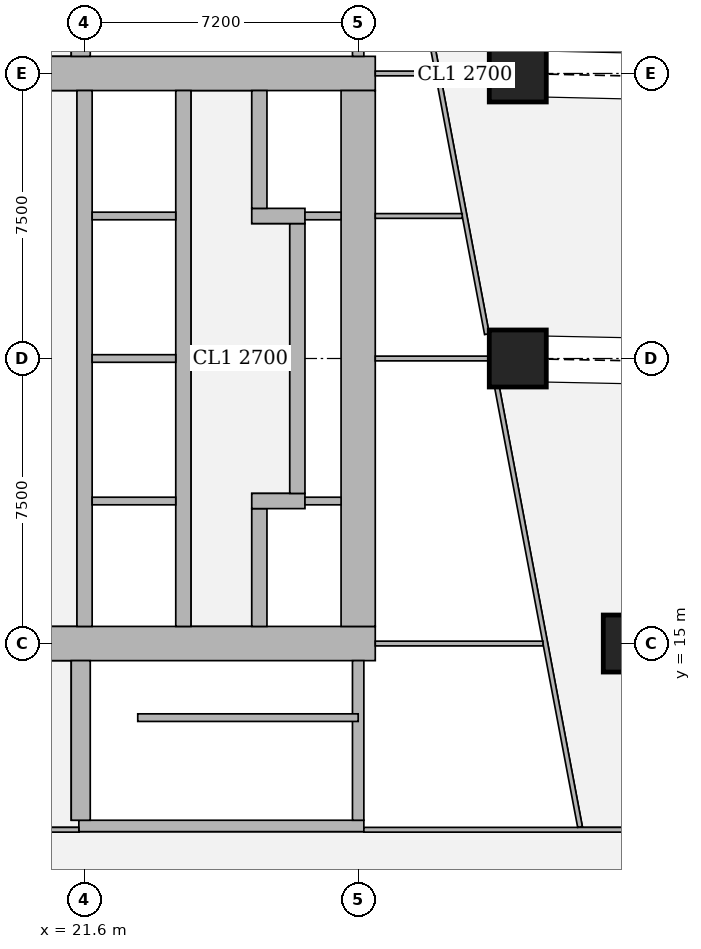
"""IFC4 building model, lengths in metres.
Left out: names, types, materials, properties, quantities, classifications, styles, units other than length and angle.
Written with IfcOpenShell. Run it as: python <this file> out.ifc"""

import sys

from ifc_helpers import new_model, si_unit, direction, frame, frame_2d, origin, origin_2d, place, context, subcontext, project, spatial, rectangle, extrude, element, fill, save


model = new_model("IFC4")
c1 = context("Model", 3, precision=1e-05, world=origin(), true_north=direction((0.0, 1.0)))
c2 = subcontext(c1, "Body", "Model", "MODEL_VIEW")
j1 = project(units=[si_unit("LENGTHUNIT", "METRE"), si_unit("PLANEANGLEUNIT", "RADIAN")], contexts=[c1])
p1 = place(None, origin())
s1 = spatial("IfcSite", under=j1, at=p1, CompositionType="ELEMENT")
p2 = place(p1, origin())
s2 = spatial("IfcBuilding", under=s1, at=p2, CompositionType="ELEMENT")
p3 = place(p2, frame((0.0, 0.0, 147.05)))
s3 = spatial("IfcBuildingStorey", under=s2, at=p3, CompositionType="ELEMENT", Elevation=147.05)
for number, where, z_axis, x_axis in (
    (1, (36.0, 15.0, 0.0), (0.0, 0.0, 1.0), (1.0, 0.0, 0.0)),
    (2, (33.0, 22.5, 0.0), (0.0, 0.0, 1.0), (1.0, 0.0, 0.0)),
    (3, (33.0, 30.0, 0.0), (0.0, 0.0, 1.0), (1.0, 0.0, 0.0)),
):
    element("IfcColumn", number, at=place(p3, frame(where, z_axis=z_axis, x_axis=x_axis)), inside=s3, PredefinedType="COLUMN", context=c2, shape_type="SweptSolid", body=[
        extrude(rectangle(XDim=1.5, YDim=1.5, at=origin_2d()), origin(), (0.0, 0.0, 1.0), 3.75),
    ])
p4 = place(p3, frame((13.95, 15.0, 0.0), z_axis=(0.0, 0.0, 1.0), x_axis=(1.0, 0.0, 0.0)))
e4 = element("IfcWall", 4, at=p4, inside=s3, PredefinedType="SHEAR", context=c2, shape_type="SweptSolid", body=[
    extrude(rectangle(XDim=15.3, YDim=0.9, at=frame_2d((7.65, 0.0))), origin(), (0.0, 0.0, 1.0), 3.75),
])
p5 = place(p4, frame((4.45, 0.0, 0.0)))
e5 = element("IfcOpeningElement", 5, at=p5, cuts=e4, PredefinedType="OPENING", context=c2, shape_type="SweptSolid", body=[
    extrude(rectangle(XDim=1.8, YDim=2.1, at=frame_2d((0.9, 1.05))), frame((0.0, 0.46, 0.0), z_axis=(0.0, -1.0, 0.0), x_axis=(1.0, 0.0, 0.0)), (0.0, 0.0, 1.0), 0.92),
])
p6 = place(p4, frame((10.7, 0.0, 0.0)))
e6 = element("IfcOpeningElement", 6, at=p6, cuts=e4, PredefinedType="OPENING", context=c2, shape_type="SweptSolid", body=[
    extrude(rectangle(XDim=1.1, YDim=2.1, at=frame_2d((0.55, 1.05))), frame((0.0, 0.46, 0.0), z_axis=(0.0, -1.0, 0.0), x_axis=(1.0, 0.0, 0.0)), (0.0, 0.0, 1.0), 0.92),
])
p7 = place(p3, frame((13.95, 30.0, 0.0), z_axis=(0.0, 0.0, 1.0), x_axis=(1.0, 0.0, 0.0)))
e7 = element("IfcWall", 7, at=p7, inside=s3, PredefinedType="SHEAR", context=c2, shape_type="SweptSolid", body=[
    extrude(rectangle(XDim=15.3, YDim=0.9, at=frame_2d((7.65, 0.0))), origin(), (0.0, 0.0, 1.0), 3.75),
])
p8 = place(p7, frame((4.45, 0.0, 0.0)))
e8 = element("IfcOpeningElement", 8, at=p8, cuts=e7, PredefinedType="OPENING", context=c2, shape_type="SweptSolid", body=[
    extrude(rectangle(XDim=1.8, YDim=2.1, at=frame_2d((0.9, 1.05))), frame((0.0, 0.46, 0.0), z_axis=(0.0, -1.0, 0.0), x_axis=(1.0, 0.0, 0.0)), (0.0, 0.0, 1.0), 0.92),
])
p9 = place(p7, frame((10.7, 0.0, 0.0)))
e9 = element("IfcOpeningElement", 9, at=p9, cuts=e7, PredefinedType="OPENING", context=c2, shape_type="SweptSolid", body=[
    extrude(rectangle(XDim=1.1, YDim=2.1, at=frame_2d((0.55, 1.05))), frame((0.0, 0.46, 0.0), z_axis=(0.0, -1.0, 0.0), x_axis=(1.0, 0.0, 0.0)), (0.0, 0.0, 1.0), 0.92),
])
p10 = place(p3, frame((28.8, 15.45, 0.0), z_axis=(0.0, 0.0, 1.0), x_axis=(0.0, 1.0, 0.0)))
e10 = element("IfcWall", 10, at=p10, inside=s3, PredefinedType="SHEAR", context=c2, shape_type="SweptSolid", body=[
    extrude(rectangle(XDim=14.1, YDim=0.9, at=frame_2d((7.05, 0.0))), origin(), (0.0, 0.0, 1.0), 3.75),
])
p11 = place(p3, frame((21.6, 15.45, 0.0), z_axis=(0.0, 0.0, 1.0), x_axis=(0.0, 1.0, 0.0)))
e11 = element("IfcWall", 11, at=p11, inside=s3, PredefinedType="SHEAR", context=c2, shape_type="SweptSolid", body=[
    extrude(rectangle(XDim=14.1, YDim=0.4, at=frame_2d((7.05, 0.0))), origin(), (0.0, 0.0, 1.0), 3.75),
])
p12 = place(p11, frame((0.875, 0.0, 0.0)))
e12 = element("IfcOpeningElement", 12, at=p12, cuts=e11, PredefinedType="OPENING", context=c2, shape_type="SweptSolid", body=[
    extrude(rectangle(XDim=1.1, YDim=2.1, at=frame_2d((0.55, 1.05))), frame((0.0, 0.21, 0.0), z_axis=(0.0, -1.0, 0.0), x_axis=(1.0, 0.0, 0.0)), (0.0, 0.0, 1.0), 0.42),
])
p13 = place(p11, frame((4.625, 0.0, 0.0)))
e13 = element("IfcOpeningElement", 13, at=p13, cuts=e11, PredefinedType="OPENING", context=c2, shape_type="SweptSolid", body=[
    extrude(rectangle(XDim=1.1, YDim=2.1, at=frame_2d((0.55, 1.05))), frame((0.0, 0.21, 0.0), z_axis=(0.0, -1.0, 0.0), x_axis=(1.0, 0.0, 0.0)), (0.0, 0.0, 1.0), 0.42),
])
p14 = place(p11, frame((8.375, 0.0, 0.0)))
e14 = element("IfcOpeningElement", 14, at=p14, cuts=e11, PredefinedType="OPENING", context=c2, shape_type="SweptSolid", body=[
    extrude(rectangle(XDim=1.1, YDim=2.1, at=frame_2d((0.55, 1.05))), frame((0.0, 0.21, 0.0), z_axis=(0.0, -1.0, 0.0), x_axis=(1.0, 0.0, 0.0)), (0.0, 0.0, 1.0), 0.42),
])
p15 = place(p11, frame((12.125, 0.0, 0.0)))
e15 = element("IfcOpeningElement", 15, at=p15, cuts=e11, PredefinedType="OPENING", context=c2, shape_type="SweptSolid", body=[
    extrude(rectangle(XDim=1.1, YDim=2.1, at=frame_2d((0.55, 1.05))), frame((0.0, 0.21, 0.0), z_axis=(0.0, -1.0, 0.0), x_axis=(1.0, 0.0, 0.0)), (0.0, 0.0, 1.0), 0.42),
])
p16 = place(p3, frame((24.2, 15.45, 0.0), z_axis=(0.0, 0.0, 1.0), x_axis=(0.0, 1.0, 0.0)))
e16 = element("IfcWall", 16, at=p16, inside=s3, PredefinedType="SHEAR", context=c2, shape_type="SweptSolid", body=[
    extrude(rectangle(XDim=14.1, YDim=0.4, at=frame_2d((7.05, 0.0))), origin(), (0.0, 0.0, 1.0), 3.75),
])
p17 = place(p3, frame((26.2, 15.45, 0.0), z_axis=(0.0, 0.0, 1.0), x_axis=(0.0, 1.0, 0.0)))
e17 = element("IfcWall", 17, at=p17, inside=s3, PredefinedType="SHEAR", context=c2, shape_type="SweptSolid", body=[
    extrude(rectangle(XDim=3.1, YDim=0.4, at=frame_2d((1.55, 0.0))), origin(), (0.0, 0.0, 1.0), 3.75),
])
p18 = place(p17, frame((0.825, 0.0, 0.0)))
e18 = element("IfcOpeningElement", 18, at=p18, cuts=e17, PredefinedType="OPENING", context=c2, shape_type="SweptSolid", body=[
    extrude(rectangle(XDim=1.2, YDim=2.1, at=frame_2d((0.6, 1.05))), frame((0.0, 0.21, 0.0), z_axis=(0.0, -1.0, 0.0), x_axis=(1.0, 0.0, 0.0)), (0.0, 0.0, 1.0), 0.42),
])
p19 = place(p3, frame((26.0, 18.75, 0.0), z_axis=(0.0, 0.0, 1.0), x_axis=(1.0, 0.0, 0.0)))
e19 = element("IfcWall", 19, at=p19, inside=s3, PredefinedType="SHEAR", context=c2, shape_type="SweptSolid", body=[
    extrude(rectangle(XDim=1.4, YDim=0.4, at=frame_2d((0.7, 0.0))), origin(), (0.0, 0.0, 1.0), 3.75),
])
p20 = place(p3, frame((27.2, 18.95, 0.0), z_axis=(0.0, 0.0, 1.0), x_axis=(0.0, 1.0, 0.0)))
e20 = element("IfcWall", 20, at=p20, inside=s3, PredefinedType="SHEAR", context=c2, shape_type="SweptSolid", body=[
    extrude(rectangle(XDim=7.1, YDim=0.4, at=frame_2d((3.55, 0.0))), origin(), (0.0, 0.0, 1.0), 3.75),
])
p21 = place(p3, frame((26.0, 26.25, 0.0), z_axis=(0.0, 0.0, 1.0), x_axis=(1.0, 0.0, 0.0)))
e21 = element("IfcWall", 21, at=p21, inside=s3, PredefinedType="SHEAR", context=c2, shape_type="SweptSolid", body=[
    extrude(rectangle(XDim=1.4, YDim=0.4, at=frame_2d((0.7, 0.0))), origin(), (0.0, 0.0, 1.0), 3.75),
])
p22 = place(p3, frame((26.2, 26.45, 0.0), z_axis=(0.0, 0.0, 1.0), x_axis=(0.0, 1.0, 0.0)))
e22 = element("IfcWall", 22, at=p22, inside=s3, PredefinedType="SHEAR", context=c2, shape_type="SweptSolid", body=[
    extrude(rectangle(XDim=3.1, YDim=0.4, at=frame_2d((1.55, 0.0))), origin(), (0.0, 0.0, 1.0), 3.75),
])
p23 = place(p22, frame((1.075, 0.0, 0.0)))
e23 = element("IfcOpeningElement", 23, at=p23, cuts=e22, PredefinedType="OPENING", context=c2, shape_type="SweptSolid", body=[
    extrude(rectangle(XDim=1.2, YDim=2.1, at=frame_2d((0.6, 1.05))), frame((0.0, 0.21, 0.0), z_axis=(0.0, -1.0, 0.0), x_axis=(1.0, 0.0, 0.0)), (0.0, 0.0, 1.0), 0.42),
])
p24 = place(p3, frame((21.45, 10.2, 0.0), z_axis=(0.0, 0.0, 1.0), x_axis=(1.0, 0.0, 0.0)))
e24 = element("IfcWall", 24, at=p24, inside=s3, PredefinedType="SHEAR", context=c2, shape_type="SweptSolid", body=[
    extrude(rectangle(XDim=7.5, YDim=0.3, at=frame_2d((3.75, 0.0))), origin(), (0.0, 0.0, 1.0), 3.75),
])
p25 = place(p24, frame((0.5, 0.0, 0.0)))
e25 = element("IfcOpeningElement", 25, at=p25, cuts=e24, PredefinedType="OPENING", context=c2, shape_type="SweptSolid", body=[
    extrude(rectangle(XDim=1.1, YDim=2.1, at=frame_2d((0.55, 1.05))), frame((0.0, 0.16, 0.0), z_axis=(0.0, -1.0, 0.0), x_axis=(1.0, 0.0, 0.0)), (0.0, 0.0, 1.0), 0.32),
])
p26 = place(p3, frame((21.5, 10.35, 0.0), z_axis=(0.0, 0.0, 1.0), x_axis=(0.0, 1.0, 0.0)))
e26 = element("IfcWall", 26, at=p26, inside=s3, PredefinedType="SHEAR", context=c2, shape_type="SweptSolid", body=[
    extrude(rectangle(XDim=4.2, YDim=0.5, at=frame_2d((2.1, 0.0))), origin(), (0.0, 0.0, 1.0), 3.75),
])
p27 = place(p3, frame((28.8, 10.35, 0.0), z_axis=(0.0, 0.0, 1.0), x_axis=(0.0, 1.0, 0.0)))
e27 = element("IfcWall", 27, at=p27, inside=s3, PredefinedType="SHEAR", context=c2, shape_type="SweptSolid", body=[
    extrude(rectangle(XDim=4.2, YDim=0.3, at=frame_2d((2.1, 0.0))), origin(), (0.0, 0.0, 1.0), 3.75),
])
p28 = place(p3, frame((21.5, 30.45, 0.0), z_axis=(0.0, 0.0, 1.0), x_axis=(0.0, 1.0, 0.0)))
e28 = element("IfcWall", 28, at=p28, inside=s3, PredefinedType="SHEAR", context=c2, shape_type="SweptSolid", body=[
    extrude(rectangle(XDim=4.2, YDim=0.5, at=frame_2d((2.1, 0.0))), origin(), (0.0, 0.0, 1.0), 3.75),
])
p29 = place(p3, frame((28.8, 30.45, 0.0), z_axis=(0.0, 0.0, 1.0), x_axis=(0.0, 1.0, 0.0)))
e29 = element("IfcWall", 29, at=p29, inside=s3, PredefinedType="SHEAR", context=c2, shape_type="SweptSolid", body=[
    extrude(rectangle(XDim=4.2, YDim=0.3, at=frame_2d((2.1, 0.0))), origin(), (0.0, 0.0, 1.0), 3.75),
])
p30 = place(p3, frame((33.877, 43.029, 0.0), z_axis=(0.0, 0.0, 1.0), x_axis=(0.185596841028, -0.98262597798, 0.0)))
e30 = element("IfcWall", 30, at=p30, inside=s3, PredefinedType="SOLIDWALL", context=c2, shape_type="SweptSolid", body=[
    extrude(rectangle(XDim=41.66, YDim=0.15, at=frame_2d((20.83, 0.0))), origin(), (0.0, 0.0, 1.0), 2.5),
])
p31 = place(p30, frame((12.57, 0.0, 0.0)))
e31 = element("IfcOpeningElement", 31, at=p31, cuts=e30, PredefinedType="OPENING", context=c2, shape_type="SweptSolid", body=[
    extrude(rectangle(XDim=1.0, YDim=2.1, at=frame_2d((0.5, 1.05))), frame((0.0, 0.085, 0.0), z_axis=(0.0, -1.0, 0.0), x_axis=(1.0, 0.0, 0.0)), (0.0, 0.0, 1.0), 0.17),
])
p32 = place(p30, frame((16.386, 0.0, 0.0)))
e32 = element("IfcOpeningElement", 32, at=p32, cuts=e30, PredefinedType="OPENING", context=c2, shape_type="SweptSolid", body=[
    extrude(rectangle(XDim=1.0, YDim=2.1, at=frame_2d((0.5, 1.05))), frame((0.0, 0.085, 0.0), z_axis=(0.0, -1.0, 0.0), x_axis=(1.0, 0.0, 0.0)), (0.0, 0.0, 1.0), 0.17),
])
p33 = place(p30, frame((31.166, 0.0, 0.0)))
e33 = element("IfcOpeningElement", 33, at=p33, cuts=e30, PredefinedType="OPENING", context=c2, shape_type="SweptSolid", body=[
    extrude(rectangle(XDim=1.0, YDim=2.1, at=frame_2d((0.5, 1.05))), frame((0.0, 0.085, 0.0), z_axis=(0.0, -1.0, 0.0), x_axis=(1.0, 0.0, 0.0)), (0.0, 0.0, 1.0), 0.17),
])
p34 = place(p3, frame((10.162, 10.1, 0.0), z_axis=(0.0, 0.0, 1.0), x_axis=(1.0, 0.0, 0.0)))
e34 = element("IfcWall", 34, at=p34, inside=s3, PredefinedType="PARTITIONING", context=c2, shape_type="SweptSolid", body=[
    extrude(rectangle(XDim=11.288, YDim=0.125, at=frame_2d((5.644, 0.0))), origin(), (0.0, 0.0, 1.0), 3.5),
])
p35 = place(p34, frame((7.833, 0.0, 0.0)))
e35 = element("IfcOpeningElement", 35, at=p35, cuts=e34, PredefinedType="OPENING", context=c2, shape_type="SweptSolid", body=[
    extrude(rectangle(XDim=1.8, YDim=2.1, at=frame_2d((0.9, 1.05))), frame((0.0, 0.073, 0.0), z_axis=(0.0, -1.0, 0.0), x_axis=(1.0, 0.0, 0.0)), (0.0, 0.0, 1.0), 0.145),
])
p36 = place(p3, frame((28.95, 10.1, 0.0), z_axis=(0.0, 0.0, 1.0), x_axis=(1.0, 0.0, 0.0)))
e36 = element("IfcWall", 36, at=p36, inside=s3, PredefinedType="PARTITIONING", context=c2, shape_type="SweptSolid", body=[
    extrude(rectangle(XDim=9.315, YDim=0.125, at=frame_2d((4.657, 0.0))), origin(), (0.0, 0.0, 1.0), 3.5),
])
p37 = place(p3, frame((34.638, 10.174, 0.0), z_axis=(0.0, 0.0, 1.0), x_axis=(-0.185583626094, 0.982628473903, 0.0)))
e37 = element("IfcWall", 37, at=p37, inside=s3, PredefinedType="PARTITIONING", context=c2, shape_type="SweptSolid", body=[
    extrude(rectangle(XDim=11.767, YDim=0.125, at=frame_2d((5.884, 0.0))), origin(), (0.0, 0.0, 1.0), 3.5),
])
p38 = place(p37, frame((0.697, 0.0, 0.0)))
e38 = element("IfcOpeningElement", 38, at=p38, cuts=e37, PredefinedType="OPENING", context=c2, shape_type="SweptSolid", body=[
    extrude(rectangle(XDim=1.0, YDim=2.1, at=frame_2d((0.5, 1.05))), frame((0.0, 0.073, 0.0), z_axis=(0.0, -1.0, 0.0), x_axis=(1.0, 0.0, 0.0)), (0.0, 0.0, 1.0), 0.145),
])
p39 = place(p37, frame((5.734, 0.0, 0.0)))
e39 = element("IfcOpeningElement", 39, at=p39, cuts=e37, PredefinedType="OPENING", context=c2, shape_type="SweptSolid", body=[
    extrude(rectangle(XDim=1.0, YDim=2.1, at=frame_2d((0.5, 1.05))), frame((0.0, 0.073, 0.0), z_axis=(0.0, -1.0, 0.0), x_axis=(1.0, 0.0, 0.0)), (0.0, 0.0, 1.0), 0.145),
])
p40 = place(p3, frame((32.188, 23.141, 0.0), z_axis=(0.0, 0.0, 1.0), x_axis=(-0.185598625075, 0.98262564101, 0.0)))
e40 = element("IfcWall", 40, at=p40, inside=s3, PredefinedType="PARTITIONING", context=c2, shape_type="SweptSolid", body=[
    extrude(rectangle(XDim=11.891, YDim=0.125, at=frame_2d((5.946, 0.0))), origin(), (0.0, 0.0, 1.0), 3.5),
])
p41 = place(p40, frame((0.171, 0.0, 0.0)))
e41 = element("IfcOpeningElement", 41, at=p41, cuts=e40, PredefinedType="OPENING", context=c2, shape_type="SweptSolid", body=[
    extrude(rectangle(XDim=1.0, YDim=2.1, at=frame_2d((0.5, 1.05))), frame((0.0, 0.073, 0.0), z_axis=(0.0, -1.0, 0.0), x_axis=(1.0, 0.0, 0.0)), (0.0, 0.0, 1.0), 0.145),
])
p42 = place(p40, frame((3.987, 0.0, 0.0)))
e42 = element("IfcOpeningElement", 42, at=p42, cuts=e40, PredefinedType="OPENING", context=c2, shape_type="SweptSolid", body=[
    extrude(rectangle(XDim=1.0, YDim=2.1, at=frame_2d((0.5, 1.05))), frame((0.0, 0.073, 0.0), z_axis=(0.0, -1.0, 0.0), x_axis=(1.0, 0.0, 0.0)), (0.0, 0.0, 1.0), 0.145),
])
p43 = place(p40, frame((7.803, 0.0, 0.0)))
e43 = element("IfcOpeningElement", 43, at=p43, cuts=e40, PredefinedType="OPENING", context=c2, shape_type="SweptSolid", body=[
    extrude(rectangle(XDim=1.0, YDim=2.1, at=frame_2d((0.5, 1.05))), frame((0.0, 0.073, 0.0), z_axis=(0.0, -1.0, 0.0), x_axis=(1.0, 0.0, 0.0)), (0.0, 0.0, 1.0), 0.145),
])
p44 = place(p3, frame((29.25, 15.0, 0.0), z_axis=(0.0, 0.0, 1.0), x_axis=(1.0, 0.0, 0.0)))
e44 = element("IfcWall", 44, at=p44, inside=s3, PredefinedType="PARTITIONING", context=c2, shape_type="SweptSolid", body=[
    extrude(rectangle(XDim=4.413, YDim=0.125, at=frame_2d((2.207, 0.0))), origin(), (0.0, 0.0, 1.0), 3.5),
])
p45 = place(p3, frame((29.25, 22.5, 0.0), z_axis=(0.0, 0.0, 1.0), x_axis=(1.0, 0.0, 0.0)))
e45 = element("IfcWall", 45, at=p45, inside=s3, PredefinedType="PARTITIONING", context=c2, shape_type="SweptSolid", body=[
    extrude(rectangle(XDim=2.996, YDim=0.125, at=frame_2d((1.498, 0.0))), origin(), (0.0, 0.0, 1.0), 3.5),
])
p46 = place(p3, frame((29.25, 26.25, 0.0), z_axis=(0.0, 0.0, 1.0), x_axis=(1.0, 0.0, 0.0)))
e46 = element("IfcWall", 46, at=p46, inside=s3, PredefinedType="PARTITIONING", context=c2, shape_type="SweptSolid", body=[
    extrude(rectangle(XDim=2.288, YDim=0.125, at=frame_2d((1.144, 0.0))), origin(), (0.0, 0.0, 1.0), 3.5),
])
p47 = place(p3, frame((29.25, 30.0, 0.0), z_axis=(0.0, 0.0, 1.0), x_axis=(1.0, 0.0, 0.0)))
e47 = element("IfcWall", 47, at=p47, inside=s3, PredefinedType="PARTITIONING", context=c2, shape_type="SweptSolid", body=[
    extrude(rectangle(XDim=1.579, YDim=0.125, at=frame_2d((0.79, 0.0))), origin(), (0.0, 0.0, 1.0), 3.5),
])
p48 = place(p3, frame((23.0, 13.05, 0.0), z_axis=(0.0, 0.0, 1.0), x_axis=(1.0, 0.0, 0.0)))
e48 = element("IfcWall", 48, at=p48, inside=s3, PredefinedType="SHEAR", context=c2, shape_type="SweptSolid", body=[
    extrude(rectangle(XDim=5.8, YDim=0.2, at=frame_2d((2.9, 0.0))), origin(), (0.0, 0.0, 1.0), 3.75),
])
for number, where, z_axis, x_axis in (
    (49, (21.8, 18.75, 0.0), (0.0, 0.0, 1.0), (1.0, 0.0, 0.0)),
    (50, (21.8, 22.5, 0.0), (0.0, 0.0, 1.0), (1.0, 0.0, 0.0)),
    (51, (21.8, 26.25, 0.0), (0.0, 0.0, 1.0), (1.0, 0.0, 0.0)),
):
    element("IfcWall", number, at=place(p3, frame(where, z_axis=z_axis, x_axis=x_axis)), inside=s3, PredefinedType="SOLIDWALL", context=c2, shape_type="SweptSolid", body=[
        extrude(rectangle(XDim=2.2, YDim=0.2, at=frame_2d((1.1, 0.0))), origin(), (0.0, 0.0, 1.0), 3.5),
    ])
for number, where, z_axis, x_axis in (
    (52, (27.4, 18.75, 0.0), (0.0, 0.0, 1.0), (1.0, 0.0, 0.0)),
    (53, (27.4, 26.25, 0.0), (0.0, 0.0, 1.0), (1.0, 0.0, 0.0)),
):
    element("IfcWall", number, at=place(p3, frame(where, z_axis=z_axis, x_axis=x_axis)), inside=s3, PredefinedType="SOLIDWALL", context=c2, shape_type="SweptSolid", body=[
        extrude(rectangle(XDim=0.95, YDim=0.2, at=frame_2d((0.475, 0.0))), origin(), (0.0, 0.0, 1.0), 3.5),
    ])
p49 = place(p38, origin())
e54 = element("IfcDoor", 54, at=p49, inside=s3, OperationType="SINGLE_SWING_LEFT", PredefinedType="DOOR", context=c2, shape_type="SweptSolid", body=[
    extrude(rectangle(XDim=1.0, YDim=2.1, at=frame_2d((0.5, 1.05))), frame((0.0, 0.025, 0.0), z_axis=(0.0, -1.0, 0.0), x_axis=(1.0, 0.0, 0.0)), (0.0, 0.0, 1.0), 0.05),
])
fill(e38, e54)
p50 = place(p39, origin())
e55 = element("IfcDoor", 55, at=p50, inside=s3, OperationType="SINGLE_SWING_LEFT", PredefinedType="DOOR", context=c2, shape_type="SweptSolid", body=[
    extrude(rectangle(XDim=1.0, YDim=2.1, at=frame_2d((0.5, 1.05))), frame((0.0, 0.025, 0.0), z_axis=(0.0, -1.0, 0.0), x_axis=(1.0, 0.0, 0.0)), (0.0, 0.0, 1.0), 0.05),
])
fill(e39, e55)
p51 = place(p41, origin())
e56 = element("IfcDoor", 56, at=p51, inside=s3, OperationType="SINGLE_SWING_LEFT", PredefinedType="DOOR", context=c2, shape_type="SweptSolid", body=[
    extrude(rectangle(XDim=1.0, YDim=2.1, at=frame_2d((0.5, 1.05))), frame((0.0, 0.025, 0.0), z_axis=(0.0, -1.0, 0.0), x_axis=(1.0, 0.0, 0.0)), (0.0, 0.0, 1.0), 0.05),
])
fill(e41, e56)
p52 = place(p42, origin())
e57 = element("IfcDoor", 57, at=p52, inside=s3, OperationType="SINGLE_SWING_LEFT", PredefinedType="DOOR", context=c2, shape_type="SweptSolid", body=[
    extrude(rectangle(XDim=1.0, YDim=2.1, at=frame_2d((0.5, 1.05))), frame((0.0, 0.025, 0.0), z_axis=(0.0, -1.0, 0.0), x_axis=(1.0, 0.0, 0.0)), (0.0, 0.0, 1.0), 0.05),
])
fill(e42, e57)
p53 = place(p6, origin())
e58 = element("IfcDoor", 58, at=p53, inside=s3, OperationType="SINGLE_SWING_RIGHT", PredefinedType="DOOR", context=c2, shape_type="SweptSolid", body=[
    extrude(rectangle(XDim=1.1, YDim=2.1, at=frame_2d((0.55, 1.05))), frame((0.0, 0.025, 0.0), z_axis=(0.0, -1.0, 0.0), x_axis=(1.0, 0.0, 0.0)), (0.0, 0.0, 1.0), 0.05),
])
fill(e6, e58)
p54 = place(p9, origin())
e59 = element("IfcDoor", 59, at=p54, inside=s3, OperationType="SINGLE_SWING_RIGHT", PredefinedType="DOOR", context=c2, shape_type="SweptSolid", body=[
    extrude(rectangle(XDim=1.1, YDim=2.1, at=frame_2d((0.55, 1.05))), frame((0.0, 0.025, 0.0), z_axis=(0.0, -1.0, 0.0), x_axis=(1.0, 0.0, 0.0)), (0.0, 0.0, 1.0), 0.05),
])
fill(e9, e59)
p55 = place(p18, origin())
e60 = element("IfcDoor", 60, at=p55, inside=s3, OperationType="DOUBLE_DOOR_SLIDING", PredefinedType="DOOR", context=c2, shape_type="SweptSolid", body=[
    extrude(rectangle(XDim=1.2, YDim=2.1, at=frame_2d((0.6, 1.05))), frame((0.0, 0.025, 0.0), z_axis=(0.0, -1.0, 0.0), x_axis=(1.0, 0.0, 0.0)), (0.0, 0.0, 1.0), 0.05),
])
fill(e18, e60)
p56 = place(p23, origin())
e61 = element("IfcDoor", 61, at=p56, inside=s3, OperationType="DOUBLE_DOOR_SLIDING", PredefinedType="DOOR", context=c2, shape_type="SweptSolid", body=[
    extrude(rectangle(XDim=1.2, YDim=2.1, at=frame_2d((0.6, 1.05))), frame((0.0, 0.025, 0.0), z_axis=(0.0, -1.0, 0.0), x_axis=(1.0, 0.0, 0.0)), (0.0, 0.0, 1.0), 0.05),
])
fill(e23, e61)
p57 = place(p12, origin())
e62 = element("IfcDoor", 62, at=p57, inside=s3, OperationType="DOUBLE_DOOR_SLIDING", PredefinedType="DOOR", context=c2, shape_type="SweptSolid", body=[
    extrude(rectangle(XDim=1.1, YDim=2.1, at=frame_2d((0.55, 1.05))), frame((0.0, 0.025, 0.0), z_axis=(0.0, -1.0, 0.0), x_axis=(1.0, 0.0, 0.0)), (0.0, 0.0, 1.0), 0.05),
])
fill(e12, e62)
p58 = place(p13, origin())
e63 = element("IfcDoor", 63, at=p58, inside=s3, OperationType="DOUBLE_DOOR_SLIDING", PredefinedType="DOOR", context=c2, shape_type="SweptSolid", body=[
    extrude(rectangle(XDim=1.1, YDim=2.1, at=frame_2d((0.55, 1.05))), frame((0.0, 0.025, 0.0), z_axis=(0.0, -1.0, 0.0), x_axis=(1.0, 0.0, 0.0)), (0.0, 0.0, 1.0), 0.05),
])
fill(e13, e63)
p59 = place(p14, origin())
e64 = element("IfcDoor", 64, at=p59, inside=s3, OperationType="DOUBLE_DOOR_SLIDING", PredefinedType="DOOR", context=c2, shape_type="SweptSolid", body=[
    extrude(rectangle(XDim=1.1, YDim=2.1, at=frame_2d((0.55, 1.05))), frame((0.0, 0.025, 0.0), z_axis=(0.0, -1.0, 0.0), x_axis=(1.0, 0.0, 0.0)), (0.0, 0.0, 1.0), 0.05),
])
fill(e14, e64)
p60 = place(p15, origin())
e65 = element("IfcDoor", 65, at=p60, inside=s3, OperationType="DOUBLE_DOOR_SLIDING", PredefinedType="DOOR", context=c2, shape_type="SweptSolid", body=[
    extrude(rectangle(XDim=1.1, YDim=2.1, at=frame_2d((0.55, 1.05))), frame((0.0, 0.025, 0.0), z_axis=(0.0, -1.0, 0.0), x_axis=(1.0, 0.0, 0.0)), (0.0, 0.0, 1.0), 0.05),
])
fill(e15, e65)
p61 = place(p25, origin())
e66 = element("IfcDoor", 66, at=p61, inside=s3, OperationType="SINGLE_SWING_LEFT", PredefinedType="DOOR", context=c2, shape_type="SweptSolid", body=[
    extrude(rectangle(XDim=1.1, YDim=2.1, at=frame_2d((0.55, 1.05))), frame((0.0, 0.025, 0.0), z_axis=(0.0, -1.0, 0.0), x_axis=(1.0, 0.0, 0.0)), (0.0, 0.0, 1.0), 0.05),
])
fill(e25, e66)
save(model, sys.argv[1])
